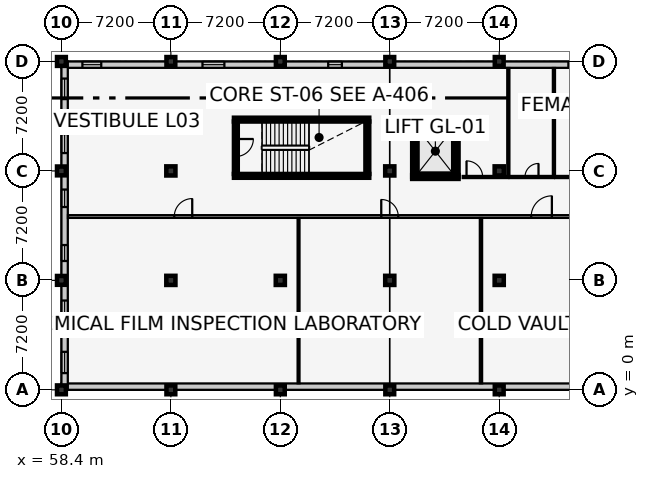
"""IFC4 building model, lengths in metres.
Left out: names, types, materials, properties, quantities, classifications, styles, units other than length and angle.
Written with IfcOpenShell. Run it as: python <this file> out.ifc"""

import sys

from ifc_helpers import new_model, si_unit, direction, frame, frame_2d, origin, origin_2d, place, context, subcontext, project, spatial, rectangle, extrude, element, fill, save


model = new_model("IFC4")
c1 = context("Model", 3, precision=1e-05, world=origin(), true_north=direction((0.0, 1.0)))
c2 = subcontext(c1, "Body", "Model", "MODEL_VIEW")
j1 = project(units=[si_unit("LENGTHUNIT", "METRE"), si_unit("PLANEANGLEUNIT", "RADIAN")], contexts=[c1])
p1 = place(None, origin())
s1 = spatial("IfcSite", under=j1, at=p1, CompositionType="ELEMENT")
p2 = place(p1, origin())
s2 = spatial("IfcBuilding", under=s1, at=p2, CompositionType="ELEMENT")
p3 = place(p2, frame((0.0, 0.0, 13.8)))
s3 = spatial("IfcBuildingStorey", under=s2, at=p3, CompositionType="ELEMENT", Elevation=13.8)
for number, where, z_axis, x_axis in (
    (1, (58.4, 0.0, 0.0), (0.0, 0.0, 1.0), (1.0, 0.0, 0.0)),
    (2, (58.4, 7.2, 0.0), (0.0, 0.0, 1.0), (1.0, 0.0, 0.0)),
    (3, (58.4, 14.4, 0.0), (0.0, 0.0, 1.0), (1.0, 0.0, 0.0)),
    (4, (58.4, 21.6, 0.0), (0.0, 0.0, 1.0), (1.0, 0.0, 0.0)),
    (5, (65.6, 0.0, 0.0), (0.0, 0.0, 1.0), (1.0, 0.0, 0.0)),
):
    element("IfcColumn", number, at=place(p3, frame(where, z_axis=z_axis, x_axis=x_axis)), inside=s3, PredefinedType="COLUMN", context=c2, shape_type="SweptSolid", body=[
        extrude(rectangle(XDim=0.58, YDim=0.58, at=origin_2d()), origin(), (0.0, 0.0, 1.0), 4.2),
    ])
for number, where, z_axis, x_axis in (
    (6, (65.6, 7.2, 0.0), (0.0, 0.0, 1.0), (1.0, 0.0, 0.0)),
    (7, (65.6, 14.4, 0.0), (0.0, 0.0, 1.0), (1.0, 0.0, 0.0)),
):
    element("IfcColumn", number, at=place(p3, frame(where, z_axis=z_axis, x_axis=x_axis)), inside=s3, PredefinedType="COLUMN", context=c2, shape_type="SweptSolid", body=[
        extrude(rectangle(XDim=0.6, YDim=0.6, at=origin_2d()), origin(), (0.0, 0.0, 1.0), 4.2),
    ])
for number, where, z_axis, x_axis in (
    (8, (65.6, 21.6, 0.0), (0.0, 0.0, 1.0), (1.0, 0.0, 0.0)),
    (9, (72.8, 0.0, 0.0), (0.0, 0.0, 1.0), (1.0, 0.0, 0.0)),
):
    element("IfcColumn", number, at=place(p3, frame(where, z_axis=z_axis, x_axis=x_axis)), inside=s3, PredefinedType="COLUMN", context=c2, shape_type="SweptSolid", body=[
        extrude(rectangle(XDim=0.58, YDim=0.58, at=origin_2d()), origin(), (0.0, 0.0, 1.0), 4.2),
    ])
p4 = place(p3, frame((72.8, 7.2, 0.0), z_axis=(0.0, 0.0, 1.0), x_axis=(1.0, 0.0, 0.0)))
e10 = element("IfcColumn", 10, at=p4, inside=s3, PredefinedType="COLUMN", context=c2, shape_type="SweptSolid", body=[
    extrude(rectangle(XDim=0.6, YDim=0.6, at=origin_2d()), origin(), (0.0, 0.0, 1.0), 4.2),
])
for number, where, z_axis, x_axis in (
    (11, (72.8, 21.6, 0.0), (0.0, 0.0, 1.0), (1.0, 0.0, 0.0)),
    (12, (80.0, 0.0, 0.0), (0.0, 0.0, 1.0), (1.0, 0.0, 0.0)),
):
    element("IfcColumn", number, at=place(p3, frame(where, z_axis=z_axis, x_axis=x_axis)), inside=s3, PredefinedType="COLUMN", context=c2, shape_type="SweptSolid", body=[
        extrude(rectangle(XDim=0.58, YDim=0.58, at=origin_2d()), origin(), (0.0, 0.0, 1.0), 4.2),
    ])
for number, where, z_axis, x_axis in (
    (13, (80.0, 7.2, 0.0), (0.0, 0.0, 1.0), (1.0, 0.0, 0.0)),
    (14, (80.0, 14.4, 0.0), (0.0, 0.0, 1.0), (1.0, 0.0, 0.0)),
):
    element("IfcColumn", number, at=place(p3, frame(where, z_axis=z_axis, x_axis=x_axis)), inside=s3, PredefinedType="COLUMN", context=c2, shape_type="SweptSolid", body=[
        extrude(rectangle(XDim=0.6, YDim=0.6, at=origin_2d()), origin(), (0.0, 0.0, 1.0), 4.2),
    ])
for number, where, z_axis, x_axis in (
    (15, (80.0, 21.6, 0.0), (0.0, 0.0, 1.0), (1.0, 0.0, 0.0)),
    (16, (87.2, 0.0, 0.0), (0.0, 0.0, 1.0), (1.0, 0.0, 0.0)),
):
    element("IfcColumn", number, at=place(p3, frame(where, z_axis=z_axis, x_axis=x_axis)), inside=s3, PredefinedType="COLUMN", context=c2, shape_type="SweptSolid", body=[
        extrude(rectangle(XDim=0.58, YDim=0.58, at=origin_2d()), origin(), (0.0, 0.0, 1.0), 4.2),
    ])
for number, where, z_axis, x_axis in (
    (17, (87.2, 7.2, 0.0), (0.0, 0.0, 1.0), (1.0, 0.0, 0.0)),
    (18, (87.2, 14.4, 0.0), (0.0, 0.0, 1.0), (1.0, 0.0, 0.0)),
):
    element("IfcColumn", number, at=place(p3, frame(where, z_axis=z_axis, x_axis=x_axis)), inside=s3, PredefinedType="COLUMN", context=c2, shape_type="SweptSolid", body=[
        extrude(rectangle(XDim=0.6, YDim=0.6, at=origin_2d()), origin(), (0.0, 0.0, 1.0), 4.2),
    ])
p5 = place(p3, frame((87.2, 21.6, 0.0), z_axis=(0.0, 0.0, 1.0), x_axis=(1.0, 0.0, 0.0)))
e19 = element("IfcColumn", 19, at=p5, inside=s3, PredefinedType="COLUMN", context=c2, shape_type="SweptSolid", body=[
    extrude(rectangle(XDim=0.58, YDim=0.58, at=origin_2d()), origin(), (0.0, 0.0, 1.0), 4.2),
])
p6 = place(p3, frame((94.4, 0.21, 0.0), z_axis=(0.0, 0.0, 1.0), x_axis=(-1.0, 0.0, 0.0)))
e20 = element("IfcWall", 20, at=p6, inside=s3, PredefinedType="SOLIDWALL", context=c2, shape_type="SweptSolid", body=[
    extrude(rectangle(XDim=36.0, YDim=0.42, at=frame_2d((18.0, 0.0))), origin(), (0.0, 0.0, 1.0), 3.175),
])
p7 = place(p3, frame((58.4, 21.39, 0.0), z_axis=(0.0, 0.0, 1.0), x_axis=(1.0, 0.0, 0.0)))
e21 = element("IfcWall", 21, at=p7, inside=s3, PredefinedType="SOLIDWALL", context=c2, shape_type="SweptSolid", body=[
    extrude(rectangle(XDim=36.0, YDim=0.42, at=frame_2d((18.0, 0.0))), origin(), (0.0, 0.0, 1.0), 3.175),
])
p8 = place(p7, frame((1.38, 0.0, 0.9)))
e22 = element("IfcOpeningElement", 22, at=p8, cuts=e21, PredefinedType="OPENING", context=c2, shape_type="SweptSolid", body=[
    extrude(rectangle(XDim=1.24, YDim=1.75, at=frame_2d((0.62, 0.875))), frame((0.0, 0.222, 0.0), z_axis=(0.0, -1.0, 0.0), x_axis=(1.0, 0.0, 0.0)), (0.0, 0.0, 1.0), 0.444),
])
p9 = place(p7, frame((9.28, 0.0, 0.9)))
e23 = element("IfcOpeningElement", 23, at=p9, cuts=e21, PredefinedType="OPENING", context=c2, shape_type="SweptSolid", body=[
    extrude(rectangle(XDim=1.44, YDim=1.75, at=frame_2d((0.72, 0.875))), frame((0.0, 0.222, 0.0), z_axis=(0.0, -1.0, 0.0), x_axis=(1.0, 0.0, 0.0)), (0.0, 0.0, 1.0), 0.444),
])
p10 = place(p7, frame((17.55, 0.0, 0.9)))
e24 = element("IfcOpeningElement", 24, at=p10, cuts=e21, PredefinedType="OPENING", context=c2, shape_type="SweptSolid", body=[
    extrude(rectangle(XDim=0.9, YDim=1.35, at=frame_2d((0.45, 0.675))), frame((0.0, 0.222, 0.0), z_axis=(0.0, -1.0, 0.0), x_axis=(1.0, 0.0, 0.0)), (0.0, 0.0, 1.0), 0.444),
])
p11 = place(p7, frame((33.35, 0.0, 0.9)))
e25 = element("IfcOpeningElement", 25, at=p11, cuts=e21, PredefinedType="OPENING", context=c2, shape_type="SweptSolid", body=[
    extrude(rectangle(XDim=1.3, YDim=1.35, at=frame_2d((0.65, 0.675))), frame((0.0, 0.222, 0.0), z_axis=(0.0, -1.0, 0.0), x_axis=(1.0, 0.0, 0.0)), (0.0, 0.0, 1.0), 0.444),
])
p12 = place(p3, frame((58.61, 0.0, 0.0), z_axis=(0.0, 0.0, 1.0), x_axis=(0.0, 1.0, 0.0)))
e26 = element("IfcWall", 26, at=p12, inside=s3, PredefinedType="SOLIDWALL", context=c2, shape_type="SweptSolid", body=[
    extrude(rectangle(XDim=21.6, YDim=0.42, at=frame_2d((10.8, 0.0))), origin(), (0.0, 0.0, 1.0), 3.215),
])
p13 = place(p12, frame((1.1, 0.0, 0.9)))
e27 = element("IfcOpeningElement", 27, at=p13, cuts=e26, PredefinedType="OPENING", context=c2, shape_type="SweptSolid", body=[
    extrude(rectangle(XDim=1.4, YDim=1.35, at=frame_2d((0.7, 0.675))), frame((0.0, 0.222, 0.0), z_axis=(0.0, -1.0, 0.0), x_axis=(1.0, 0.0, 0.0)), (0.0, 0.0, 1.0), 0.444),
])
p14 = place(p12, frame((4.925, 0.0, 0.9)))
e28 = element("IfcOpeningElement", 28, at=p14, cuts=e26, PredefinedType="OPENING", context=c2, shape_type="SweptSolid", body=[
    extrude(rectangle(XDim=0.95, YDim=1.45, at=frame_2d((0.475, 0.725))), frame((0.0, 0.222, 0.0), z_axis=(0.0, -1.0, 0.0), x_axis=(1.0, 0.0, 0.0)), (0.0, 0.0, 1.0), 0.444),
])
p15 = place(p12, frame((8.475, 0.0, 0.9)))
e29 = element("IfcOpeningElement", 29, at=p15, cuts=e26, PredefinedType="OPENING", context=c2, shape_type="SweptSolid", body=[
    extrude(rectangle(XDim=1.05, YDim=1.45, at=frame_2d((0.525, 0.725))), frame((0.0, 0.222, 0.0), z_axis=(0.0, -1.0, 0.0), x_axis=(1.0, 0.0, 0.0)), (0.0, 0.0, 1.0), 0.444),
])
p16 = place(p12, frame((12.025, 0.0, 0.9)))
e30 = element("IfcOpeningElement", 30, at=p16, cuts=e26, PredefinedType="OPENING", context=c2, shape_type="SweptSolid", body=[
    extrude(rectangle(XDim=1.15, YDim=1.45, at=frame_2d((0.575, 0.725))), frame((0.0, 0.222, 0.0), z_axis=(0.0, -1.0, 0.0), x_axis=(1.0, 0.0, 0.0)), (0.0, 0.0, 1.0), 0.444),
])
p17 = place(p12, frame((15.575, 0.0, 0.9)))
e31 = element("IfcOpeningElement", 31, at=p17, cuts=e26, PredefinedType="OPENING", context=c2, shape_type="SweptSolid", body=[
    extrude(rectangle(XDim=1.25, YDim=1.45, at=frame_2d((0.625, 0.725))), frame((0.0, 0.222, 0.0), z_axis=(0.0, -1.0, 0.0), x_axis=(1.0, 0.0, 0.0)), (0.0, 0.0, 1.0), 0.444),
])
p18 = place(p12, frame((19.125, 0.0, 0.9)))
e32 = element("IfcOpeningElement", 32, at=p18, cuts=e26, PredefinedType="OPENING", context=c2, shape_type="SweptSolid", body=[
    extrude(rectangle(XDim=1.35, YDim=1.45, at=frame_2d((0.675, 0.725))), frame((0.0, 0.222, 0.0), z_axis=(0.0, -1.0, 0.0), x_axis=(1.0, 0.0, 0.0)), (0.0, 0.0, 1.0), 0.444),
])
for number, where, z_axis, x_axis in (
    (33, (69.75, 14.075, 0.0), (0.0, 0.0, 1.0), (1.0, 0.0, 0.0)),
    (34, (78.65, 17.775, 0.0), (0.0, 0.0, 1.0), (-1.0, 0.0, 0.0)),
):
    element("IfcWall", number, at=place(p3, frame(where, z_axis=z_axis, x_axis=x_axis)), inside=s3, PredefinedType="SHEAR", context=c2, shape_type="SweptSolid", body=[
        extrude(rectangle(XDim=8.9, YDim=0.25, at=frame_2d((4.45, 0.0))), origin(), (0.0, 0.0, 1.0), 3.88),
    ])
p19 = place(p3, frame((69.875, 17.65, 0.0), z_axis=(0.0, 0.0, 1.0), x_axis=(0.0, -1.0, 0.0)))
e35 = element("IfcWall", 35, at=p19, inside=s3, PredefinedType="SHEAR", context=c2, shape_type="SweptSolid", body=[
    extrude(rectangle(XDim=3.45, YDim=0.25, at=frame_2d((1.725, 0.0))), origin(), (0.0, 0.0, 1.0), 3.88),
])
p20 = place(p19, frame((1.15, 0.0, 0.0)))
e36 = element("IfcOpeningElement", 36, at=p20, cuts=e35, PredefinedType="OPENING", context=c2, shape_type="SweptSolid", body=[
    extrude(rectangle(XDim=1.15, YDim=2.15, at=frame_2d((0.575, 1.075))), frame((0.0, 0.137, 0.0), z_axis=(0.0, -1.0, 0.0), x_axis=(1.0, 0.0, 0.0)), (0.0, 0.0, 1.0), 0.274),
])
p21 = place(p3, frame((78.525, 14.2, 0.0), z_axis=(0.0, 0.0, 1.0), x_axis=(0.0, 1.0, 0.0)))
e37 = element("IfcWall", 37, at=p21, inside=s3, PredefinedType="SHEAR", context=c2, shape_type="SweptSolid", body=[
    extrude(rectangle(XDim=3.45, YDim=0.25, at=frame_2d((1.725, 0.0))), origin(), (0.0, 0.0, 1.0), 3.88),
])
p22 = place(p3, frame((81.475, 14.0, 0.0), z_axis=(0.0, 0.0, 1.0), x_axis=(1.0, 0.0, 0.0)))
e38 = element("IfcWall", 38, at=p22, inside=s3, PredefinedType="SHEAR", context=c2, shape_type="SweptSolid", body=[
    extrude(rectangle(XDim=3.05, YDim=0.25, at=frame_2d((1.525, 0.0))), origin(), (0.0, 0.0, 1.0), 3.88),
])
p23 = place(p22, frame((0.725, 0.0, 0.0)))
e39 = element("IfcOpeningElement", 39, at=p23, cuts=e38, PredefinedType="OPENING", context=c2, shape_type="SweptSolid", body=[
    extrude(rectangle(XDim=1.6, YDim=2.3, at=frame_2d((0.8, 1.15))), frame((0.0, 0.137, 0.0), z_axis=(0.0, -1.0, 0.0), x_axis=(1.0, 0.0, 0.0)), (0.0, 0.0, 1.0), 0.274),
])
p24 = place(p3, frame((84.525, 17.4, 0.0), z_axis=(0.0, 0.0, 1.0), x_axis=(-1.0, 0.0, 0.0)))
e40 = element("IfcWall", 40, at=p24, inside=s3, PredefinedType="SHEAR", context=c2, shape_type="SweptSolid", body=[
    extrude(rectangle(XDim=3.05, YDim=0.25, at=frame_2d((1.525, 0.0))), origin(), (0.0, 0.0, 1.0), 3.88),
])
for number, where, z_axis, x_axis in (
    (41, (81.6, 17.4, 0.0), (0.0, 0.0, 1.0), (0.0, -1.0, 0.0)),
    (42, (84.4, 14.0, 0.0), (0.0, 0.0, 1.0), (0.0, 1.0, 0.0)),
):
    element("IfcWall", number, at=place(p3, frame(where, z_axis=z_axis, x_axis=x_axis)), inside=s3, PredefinedType="SHEAR", context=c2, shape_type="SweptSolid", body=[
        extrude(rectangle(XDim=3.4, YDim=0.25, at=frame_2d((1.7, 0.0))), origin(), (0.0, 0.0, 1.0), 3.88),
    ])
p25 = place(p3, frame((58.83, 11.4, 0.0), z_axis=(0.0, 0.0, 1.0), x_axis=(1.0, 0.0, 0.0)))
e43 = element("IfcWall", 43, at=p25, inside=s3, PredefinedType="PARTITIONING", context=c2, shape_type="SweptSolid", body=[
    extrude(rectangle(XDim=35.14, YDim=0.18, at=frame_2d((17.57, 0.0))), origin(), (0.0, 0.0, 1.0), 3.88),
])
p26 = place(p25, frame((6.995, 0.0, 0.0)))
e44 = element("IfcOpeningElement", 44, at=p26, cuts=e43, PredefinedType="OPENING", context=c2, shape_type="SweptSolid", body=[
    extrude(rectangle(XDim=1.18, YDim=2.2, at=frame_2d((0.59, 1.1))), frame((0.0, 0.102, 0.0), z_axis=(0.0, -1.0, 0.0), x_axis=(1.0, 0.0, 0.0)), (0.0, 0.0, 1.0), 0.204),
])
p27 = place(p25, frame((20.61, 0.0, 0.0)))
e45 = element("IfcOpeningElement", 45, at=p27, cuts=e43, PredefinedType="OPENING", context=c2, shape_type="SweptSolid", body=[
    extrude(rectangle(XDim=1.12, YDim=2.15, at=frame_2d((0.56, 1.075))), frame((0.0, 0.102, 0.0), z_axis=(0.0, -1.0, 0.0), x_axis=(1.0, 0.0, 0.0)), (0.0, 0.0, 1.0), 0.204),
])
p28 = place(p25, frame((30.475, 0.0, 0.0)))
e46 = element("IfcOpeningElement", 46, at=p28, cuts=e43, PredefinedType="OPENING", context=c2, shape_type="SweptSolid", body=[
    extrude(rectangle(XDim=1.36, YDim=2.2, at=frame_2d((0.68, 1.1))), frame((0.0, 0.102, 0.0), z_axis=(0.0, -1.0, 0.0), x_axis=(1.0, 0.0, 0.0)), (0.0, 0.0, 1.0), 0.204),
])
p29 = place(p3, frame((74.0, 0.43, 0.0), z_axis=(0.0, 0.0, 1.0), x_axis=(0.0, 1.0, 0.0)))
e47 = element("IfcWall", 47, at=p29, inside=s3, PredefinedType="PARTITIONING", context=c2, shape_type="SweptSolid", body=[
    extrude(rectangle(XDim=10.87, YDim=0.125, at=frame_2d((5.435, 0.0))), origin(), (0.0, 0.0, 1.0), 3.88),
])
p30 = place(p3, frame((86.0, 0.43, 0.0), z_axis=(0.0, 0.0, 1.0), x_axis=(0.0, 1.0, 0.0)))
e48 = element("IfcWall", 48, at=p30, inside=s3, PredefinedType="PARTITIONING", context=c2, shape_type="SweptSolid", body=[
    extrude(rectangle(XDim=10.87, YDim=0.15, at=frame_2d((5.435, 0.0))), origin(), (0.0, 0.0, 1.0), 3.88),
])
p31 = place(p3, frame((84.8, 14.0, 0.0), z_axis=(0.0, 0.0, 1.0), x_axis=(1.0, 0.0, 0.0)))
e49 = element("IfcWall", 49, at=p31, inside=s3, PredefinedType="PARTITIONING", context=c2, shape_type="SweptSolid", body=[
    extrude(rectangle(XDim=3.0, YDim=0.14, at=frame_2d((1.5, 0.0))), origin(), (0.0, 0.0, 1.0), 3.88),
])
p32 = place(p31, frame((0.25, 0.0, 0.0)))
e50 = element("IfcOpeningElement", 50, at=p32, cuts=e49, PredefinedType="OPENING", context=c2, shape_type="SweptSolid", body=[
    extrude(rectangle(XDim=1.06, YDim=2.1, at=frame_2d((0.53, 1.05))), frame((0.0, 0.082, 0.0), z_axis=(0.0, -1.0, 0.0), x_axis=(1.0, 0.0, 0.0)), (0.0, 0.0, 1.0), 0.164),
])
p33 = place(p3, frame((87.8, 14.08, 0.0), z_axis=(0.0, 0.0, 1.0), x_axis=(0.0, 1.0, 0.0)))
e51 = element("IfcWall", 51, at=p33, inside=s3, PredefinedType="PARTITIONING", context=c2, shape_type="SweptSolid", body=[
    extrude(rectangle(XDim=7.09, YDim=0.14, at=frame_2d((3.545, 0.0))), origin(), (0.0, 0.0, 1.0), 3.88),
])
p34 = place(p3, frame((87.88, 14.0, 0.0), z_axis=(0.0, 0.0, 1.0), x_axis=(1.0, 0.0, 0.0)))
e52 = element("IfcWall", 52, at=p34, inside=s3, PredefinedType="PARTITIONING", context=c2, shape_type="SweptSolid", body=[
    extrude(rectangle(XDim=2.92, YDim=0.14, at=frame_2d((1.46, 0.0))), origin(), (0.0, 0.0, 1.0), 3.88),
])
p35 = place(p34, frame((1.015, 0.0, 0.0)))
e53 = element("IfcOpeningElement", 53, at=p35, cuts=e52, PredefinedType="OPENING", context=c2, shape_type="SweptSolid", body=[
    extrude(rectangle(XDim=0.89, YDim=2.05, at=frame_2d((0.445, 1.025))), frame((0.0, 0.082, 0.0), z_axis=(0.0, -1.0, 0.0), x_axis=(1.0, 0.0, 0.0)), (0.0, 0.0, 1.0), 0.164),
])
p36 = place(p3, frame((90.8, 14.08, 0.0), z_axis=(0.0, 0.0, 1.0), x_axis=(0.0, 1.0, 0.0)))
e54 = element("IfcWall", 54, at=p36, inside=s3, PredefinedType="PARTITIONING", context=c2, shape_type="SweptSolid", body=[
    extrude(rectangle(XDim=7.09, YDim=0.14, at=frame_2d((3.545, 0.0))), origin(), (0.0, 0.0, 1.0), 3.495),
])
p37 = place(p3, frame((90.88, 14.0, 0.0), z_axis=(0.0, 0.0, 1.0), x_axis=(1.0, 0.0, 0.0)))
e55 = element("IfcWall", 55, at=p37, inside=s3, PredefinedType="PARTITIONING", context=c2, shape_type="SweptSolid", body=[
    extrude(rectangle(XDim=3.09, YDim=0.14, at=frame_2d((1.545, 0.0))), origin(), (0.0, 0.0, 1.0), 3.88),
])
p38 = place(p37, frame((1.09, 0.0, 0.0)))
e56 = element("IfcOpeningElement", 56, at=p38, cuts=e55, PredefinedType="OPENING", context=c2, shape_type="SweptSolid", body=[
    extrude(rectangle(XDim=0.91, YDim=2.06, at=frame_2d((0.455, 1.03))), frame((0.0, 0.082, 0.0), z_axis=(0.0, -1.0, 0.0), x_axis=(1.0, 0.0, 0.0)), (0.0, 0.0, 1.0), 0.164),
])
p39 = place(p8, origin())
e57 = element("IfcWindow", 57, at=p39, inside=s3, PartitioningType="SINGLE_PANEL", PredefinedType="WINDOW", context=c2, shape_type="SweptSolid", body=[
    extrude(rectangle(XDim=1.24, YDim=1.75, at=frame_2d((0.62, 0.875))), frame((0.0, 0.03, 0.0), z_axis=(0.0, -1.0, 0.0), x_axis=(1.0, 0.0, 0.0)), (0.0, 0.0, 1.0), 0.06),
])
fill(e22, e57)
p40 = place(p9, origin())
e58 = element("IfcWindow", 58, at=p40, inside=s3, PartitioningType="SINGLE_PANEL", PredefinedType="WINDOW", context=c2, shape_type="SweptSolid", body=[
    extrude(rectangle(XDim=1.44, YDim=1.75, at=frame_2d((0.72, 0.875))), frame((0.0, 0.03, 0.0), z_axis=(0.0, -1.0, 0.0), x_axis=(1.0, 0.0, 0.0)), (0.0, 0.0, 1.0), 0.06),
])
fill(e23, e58)
p41 = place(p10, origin())
e59 = element("IfcWindow", 59, at=p41, inside=s3, PartitioningType="SINGLE_PANEL", PredefinedType="WINDOW", context=c2, shape_type="SweptSolid", body=[
    extrude(rectangle(XDim=0.9, YDim=1.35, at=frame_2d((0.45, 0.675))), frame((0.0, 0.03, 0.0), z_axis=(0.0, -1.0, 0.0), x_axis=(1.0, 0.0, 0.0)), (0.0, 0.0, 1.0), 0.06),
])
fill(e24, e59)
p42 = place(p11, origin())
e60 = element("IfcWindow", 60, at=p42, inside=s3, PartitioningType="SINGLE_PANEL", PredefinedType="WINDOW", context=c2, shape_type="SweptSolid", body=[
    extrude(rectangle(XDim=1.3, YDim=1.35, at=frame_2d((0.65, 0.675))), frame((0.0, 0.03, 0.0), z_axis=(0.0, -1.0, 0.0), x_axis=(1.0, 0.0, 0.0)), (0.0, 0.0, 1.0), 0.06),
])
fill(e25, e60)
p43 = place(p13, origin())
e61 = element("IfcWindow", 61, at=p43, inside=s3, PartitioningType="SINGLE_PANEL", PredefinedType="WINDOW", context=c2, shape_type="SweptSolid", body=[
    extrude(rectangle(XDim=1.4, YDim=1.35, at=frame_2d((0.7, 0.675))), frame((0.0, 0.03, 0.0), z_axis=(0.0, -1.0, 0.0), x_axis=(1.0, 0.0, 0.0)), (0.0, 0.0, 1.0), 0.06),
])
fill(e27, e61)
p44 = place(p14, origin())
e62 = element("IfcWindow", 62, at=p44, inside=s3, PartitioningType="SINGLE_PANEL", PredefinedType="WINDOW", context=c2, shape_type="SweptSolid", body=[
    extrude(rectangle(XDim=0.95, YDim=1.45, at=frame_2d((0.475, 0.725))), frame((0.0, 0.03, 0.0), z_axis=(0.0, -1.0, 0.0), x_axis=(1.0, 0.0, 0.0)), (0.0, 0.0, 1.0), 0.06),
])
fill(e28, e62)
p45 = place(p15, origin())
e63 = element("IfcWindow", 63, at=p45, inside=s3, PartitioningType="SINGLE_PANEL", PredefinedType="WINDOW", context=c2, shape_type="SweptSolid", body=[
    extrude(rectangle(XDim=1.05, YDim=1.45, at=frame_2d((0.525, 0.725))), frame((0.0, 0.03, 0.0), z_axis=(0.0, -1.0, 0.0), x_axis=(1.0, 0.0, 0.0)), (0.0, 0.0, 1.0), 0.06),
])
fill(e29, e63)
p46 = place(p16, origin())
e64 = element("IfcWindow", 64, at=p46, inside=s3, PartitioningType="SINGLE_PANEL", PredefinedType="WINDOW", context=c2, shape_type="SweptSolid", body=[
    extrude(rectangle(XDim=1.15, YDim=1.45, at=frame_2d((0.575, 0.725))), frame((0.0, 0.03, 0.0), z_axis=(0.0, -1.0, 0.0), x_axis=(1.0, 0.0, 0.0)), (0.0, 0.0, 1.0), 0.06),
])
fill(e30, e64)
p47 = place(p17, origin())
e65 = element("IfcWindow", 65, at=p47, inside=s3, PartitioningType="SINGLE_PANEL", PredefinedType="WINDOW", context=c2, shape_type="SweptSolid", body=[
    extrude(rectangle(XDim=1.25, YDim=1.45, at=frame_2d((0.625, 0.725))), frame((0.0, 0.03, 0.0), z_axis=(0.0, -1.0, 0.0), x_axis=(1.0, 0.0, 0.0)), (0.0, 0.0, 1.0), 0.06),
])
fill(e31, e65)
p48 = place(p18, origin())
e66 = element("IfcWindow", 66, at=p48, inside=s3, PartitioningType="SINGLE_PANEL", PredefinedType="WINDOW", context=c2, shape_type="SweptSolid", body=[
    extrude(rectangle(XDim=1.35, YDim=1.45, at=frame_2d((0.675, 0.725))), frame((0.0, 0.03, 0.0), z_axis=(0.0, -1.0, 0.0), x_axis=(1.0, 0.0, 0.0)), (0.0, 0.0, 1.0), 0.06),
])
fill(e32, e66)
p49 = place(p20, origin())
e67 = element("IfcDoor", 67, at=p49, inside=s3, OperationType="SINGLE_SWING_LEFT", PredefinedType="DOOR", context=c2, shape_type="SweptSolid", body=[
    extrude(rectangle(XDim=1.15, YDim=2.15, at=frame_2d((0.575, 1.075))), frame((0.0, 0.025, 0.0), z_axis=(0.0, -1.0, 0.0), x_axis=(1.0, 0.0, 0.0)), (0.0, 0.0, 1.0), 0.05),
])
fill(e36, e67)
p50 = place(p23, origin())
e68 = element("IfcDoor", 68, at=p50, inside=s3, OperationType="DOUBLE_DOOR_SLIDING", PredefinedType="DOOR", context=c2, shape_type="SweptSolid", body=[
    extrude(rectangle(XDim=1.6, YDim=2.3, at=frame_2d((0.8, 1.15))), frame((0.0, 0.025, 0.0), z_axis=(0.0, -1.0, 0.0), x_axis=(1.0, 0.0, 0.0)), (0.0, 0.0, 1.0), 0.05),
])
fill(e39, e68)
p51 = place(p26, origin())
e69 = element("IfcDoor", 69, at=p51, inside=s3, OperationType="SINGLE_SWING_RIGHT", PredefinedType="DOOR", context=c2, shape_type="SweptSolid", body=[
    extrude(rectangle(XDim=1.18, YDim=2.2, at=frame_2d((0.59, 1.1))), frame((0.0, 0.025, 0.0), z_axis=(0.0, -1.0, 0.0), x_axis=(1.0, 0.0, 0.0)), (0.0, 0.0, 1.0), 0.05),
])
fill(e44, e69)
p52 = place(p27, origin())
e70 = element("IfcDoor", 70, at=p52, inside=s3, OperationType="SINGLE_SWING_LEFT", PredefinedType="DOOR", context=c2, shape_type="SweptSolid", body=[
    extrude(rectangle(XDim=1.12, YDim=2.15, at=frame_2d((0.56, 1.075))), frame((0.0, 0.025, 0.0), z_axis=(0.0, -1.0, 0.0), x_axis=(1.0, 0.0, 0.0)), (0.0, 0.0, 1.0), 0.05),
])
fill(e45, e70)
p53 = place(p28, origin())
e71 = element("IfcDoor", 71, at=p53, inside=s3, OperationType="SINGLE_SWING_RIGHT", PredefinedType="DOOR", context=c2, shape_type="SweptSolid", body=[
    extrude(rectangle(XDim=1.36, YDim=2.2, at=frame_2d((0.68, 1.1))), frame((0.0, 0.025, 0.0), z_axis=(0.0, -1.0, 0.0), x_axis=(1.0, 0.0, 0.0)), (0.0, 0.0, 1.0), 0.05),
])
fill(e46, e71)
p54 = place(p32, origin())
e72 = element("IfcDoor", 72, at=p54, inside=s3, OperationType="SINGLE_SWING_LEFT", PredefinedType="DOOR", context=c2, shape_type="SweptSolid", body=[
    extrude(rectangle(XDim=1.06, YDim=2.1, at=frame_2d((0.53, 1.05))), frame((0.0, 0.025, 0.0), z_axis=(0.0, -1.0, 0.0), x_axis=(1.0, 0.0, 0.0)), (0.0, 0.0, 1.0), 0.05),
])
fill(e50, e72)
p55 = place(p35, origin())
e73 = element("IfcDoor", 73, at=p55, inside=s3, OperationType="SINGLE_SWING_RIGHT", PredefinedType="DOOR", context=c2, shape_type="SweptSolid", body=[
    extrude(rectangle(XDim=0.89, YDim=2.05, at=frame_2d((0.445, 1.025))), frame((0.0, 0.025, 0.0), z_axis=(0.0, -1.0, 0.0), x_axis=(1.0, 0.0, 0.0)), (0.0, 0.0, 1.0), 0.05),
])
fill(e53, e73)
save(model, sys.argv[1])
